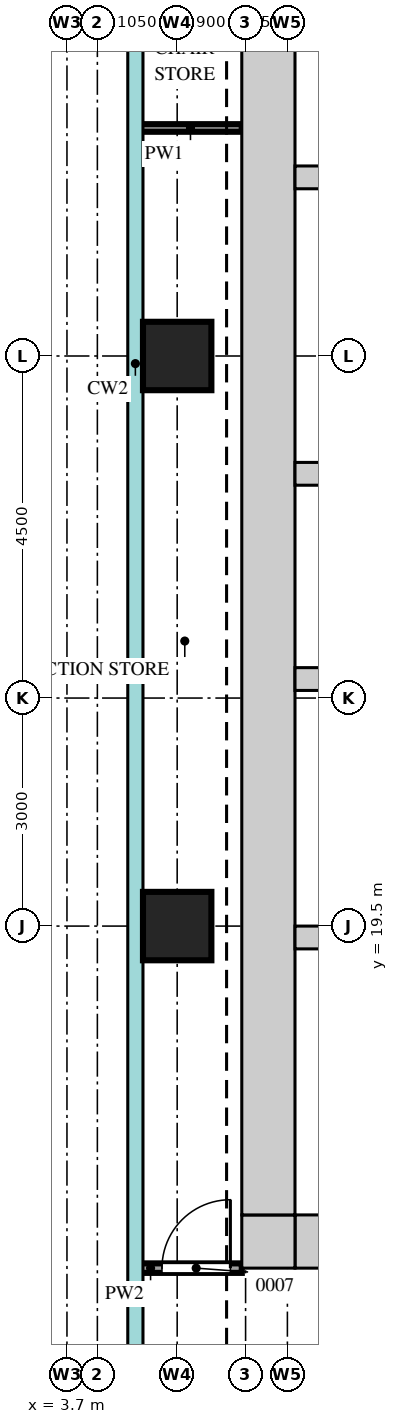
"""IFC4 building model, lengths in metres.
Left out: names, types, materials, properties, quantities, classifications, styles, units other than length and angle.
Written with IfcOpenShell. Run it as: python <this file> out.ifc"""

import sys

from ifc_helpers import new_model, si_unit, direction, frame, frame_2d, origin, origin_2d, place, context, subcontext, project, spatial, rectangle, extrude, source, transform, mapped, element, fill, save


model = new_model("IFC4")
c1 = context("Model", 3, precision=1e-05, world=origin(), true_north=direction((0.0, 1.0)))
c2 = subcontext(c1, "Body", "Model", "MODEL_VIEW")
j1 = project(units=[si_unit("LENGTHUNIT", "METRE"), si_unit("PLANEANGLEUNIT", "RADIAN")], contexts=[c1])
p1 = place(None, origin())
s1 = spatial("IfcSite", under=j1, at=p1, CompositionType="ELEMENT")
p2 = place(p1, origin())
s2 = spatial("IfcBuilding", under=s1, at=p2, CompositionType="ELEMENT")
p3 = place(p2, frame((0.0, 0.0, 262.2)))
s3 = spatial("IfcBuildingStorey", under=s2, at=p3, CompositionType="ELEMENT", Elevation=262.2)
m1 = source(origin(), c2, "Body", "SweptSolid", [
    extrude(rectangle(XDim=13.6, YDim=0.7, at=frame_2d((6.8, 0.0))), origin(), (0.0, 0.0, 1.0), 3.75),
])
p4 = place(p3, frame((6.7, 15.35, 0.0), z_axis=(0.0, 0.0, 1.0), x_axis=(1.0, 0.0, 0.0)))
e1 = element("IfcWall", 1, at=p4, inside=s3, PredefinedType="SHEAR", context=c2, shape_type="MappedRepresentation", body=[
    mapped(m1, transform((0.0, 0.0, 0.0))),
])
m2 = source(origin(), c2, "Body", "SweptSolid", [
    extrude(rectangle(XDim=1.2, YDim=2.1, at=frame_2d((0.6, 1.05))), frame((0.0, 0.36, 0.0), z_axis=(0.0, -1.0, 0.0), x_axis=(1.0, 0.0, 0.0)), (0.0, 0.0, 1.0), 0.72),
])
p5 = place(p4, frame((5.5, 0.0, 0.0)))
e2 = element("IfcOpeningElement", 2, at=p5, cuts=e1, PredefinedType="OPENING", context=c2, shape_type="MappedRepresentation", body=[
    mapped(m2, transform((0.0, 0.0, 0.0))),
])
p6 = place(p4, frame((2.15, 0.0, 0.0)))
e3 = element("IfcOpeningElement", 3, at=p6, cuts=e1, PredefinedType="OPENING", context=c2, shape_type="MappedRepresentation", body=[
    mapped(m2, transform((0.0, 0.0, 0.0))),
])
m3 = source(origin(), c2, "Body", "SweptSolid", [
    extrude(rectangle(XDim=1.0, YDim=2.1, at=frame_2d((0.5, 1.05))), frame((0.0, 0.36, 0.0), z_axis=(0.0, -1.0, 0.0), x_axis=(1.0, 0.0, 0.0)), (0.0, 0.0, 1.0), 0.72),
])
p7 = place(p4, frame((8.0, 0.0, 0.0)))
e4 = element("IfcOpeningElement", 4, at=p7, cuts=e1, PredefinedType="OPENING", context=c2, shape_type="MappedRepresentation", body=[
    mapped(m3, transform((0.0, 0.0, 0.0))),
])
m4 = source(origin(), c2, "Body", "SweptSolid", [
    extrude(rectangle(XDim=0.7, YDim=0.7, at=frame_2d((0.35, 0.0))), origin(), (0.0, 0.0, 1.0), 3.75),
])
p8 = place(p3, frame((6.0, 15.35, 0.0), z_axis=(0.0, 0.0, 1.0), x_axis=(1.0, 0.0, 0.0)))
e5 = element("IfcWall", 5, at=p8, inside=s3, PredefinedType="SHEAR", context=c2, shape_type="MappedRepresentation", body=[
    mapped(m4, transform((0.0, 0.0, 0.0))),
])
m5 = source(origin(), c2, "Body", "SweptSolid", [
    extrude(rectangle(XDim=22.6, YDim=0.7, at=frame_2d((11.3, 0.0))), origin(), (0.0, 0.0, 1.0), 3.75),
])
p9 = place(p3, frame((6.35, 15.7, 0.0), z_axis=(0.0, 0.0, 1.0), x_axis=(0.0, 1.0, 0.0)))
e6 = element("IfcWall", 6, at=p9, inside=s3, PredefinedType="SHEAR", context=c2, shape_type="MappedRepresentation", body=[
    mapped(m5, transform((0.0, 0.0, 0.0))),
])
m6 = source(origin(), c2, "Body", "SweptSolid", [
    extrude(rectangle(XDim=13.6, YDim=0.3, at=frame_2d((6.8, 0.0))), origin(), (0.0, 0.0, 1.0), 3.75),
])
p10 = place(p3, frame((6.7, 22.75, 0.0), z_axis=(0.0, 0.0, 1.0), x_axis=(1.0, 0.0, 0.0)))
e7 = element("IfcWall", 7, at=p10, inside=s3, PredefinedType="STANDARD", context=c2, shape_type="MappedRepresentation", body=[
    mapped(m6, transform((0.0, 0.0, 0.0))),
])
m7 = source(origin(), c2, "Body", "SweptSolid", [
    extrude(rectangle(XDim=9.375, YDim=0.3, at=frame_2d((4.688, 0.0))), origin(), (0.0, 0.0, 1.0), 3.75),
])
p11 = place(p3, frame((6.7, 19.35, 0.0), z_axis=(0.0, 0.0, 1.0), x_axis=(1.0, 0.0, 0.0)))
e8 = element("IfcWall", 8, at=p11, inside=s3, PredefinedType="STANDARD", context=c2, shape_type="MappedRepresentation", body=[
    mapped(m7, transform((0.0, 0.0, 0.0))),
])
m8 = source(origin(), c2, "Body", "SweptSolid", [
    extrude(rectangle(XDim=1.2, YDim=2.1, at=frame_2d((0.6, 1.05))), frame((0.0, 0.16, 0.0), z_axis=(0.0, -1.0, 0.0), x_axis=(1.0, 0.0, 0.0)), (0.0, 0.0, 1.0), 0.32),
])
p12 = place(p11, frame((0.95, 0.0, 0.0)))
e9 = element("IfcOpeningElement", 9, at=p12, cuts=e8, PredefinedType="OPENING", context=c2, shape_type="MappedRepresentation", body=[
    mapped(m8, transform((0.0, 0.0, 0.0))),
])
p13 = place(p11, frame((3.3, 0.0, 0.0)))
e10 = element("IfcOpeningElement", 10, at=p13, cuts=e8, PredefinedType="OPENING", context=c2, shape_type="MappedRepresentation", body=[
    mapped(m8, transform((0.0, 0.0, 0.0))),
])
p14 = place(p11, frame((5.55, 0.0, 0.0)))
e11 = element("IfcOpeningElement", 11, at=p14, cuts=e8, PredefinedType="OPENING", context=c2, shape_type="MappedRepresentation", body=[
    mapped(m8, transform((0.0, 0.0, 0.0))),
])
p15 = place(p11, frame((7.7, 0.0, 0.0)))
e12 = element("IfcOpeningElement", 12, at=p15, cuts=e8, PredefinedType="OPENING", context=c2, shape_type="MappedRepresentation", body=[
    mapped(m8, transform((0.0, 0.0, 0.0))),
])
p16 = place(p3, frame((6.7, 29.35, 0.0), z_axis=(0.0, 0.0, 1.0), x_axis=(1.0, 0.0, 0.0)))
e13 = element("IfcWall", 13, at=p16, inside=s3, PredefinedType="STANDARD", context=c2, shape_type="MappedRepresentation", body=[
    mapped(m6, transform((0.0, 0.0, 0.0))),
])
p17 = place(p16, frame((1.05, 0.0, 0.0)))
e14 = element("IfcOpeningElement", 14, at=p17, cuts=e13, PredefinedType="OPENING", context=c2, shape_type="MappedRepresentation", body=[
    mapped(m8, transform((0.0, 0.0, 0.0))),
])
p18 = place(p16, frame((3.6, 0.0, 0.0)))
e15 = element("IfcOpeningElement", 15, at=p18, cuts=e13, PredefinedType="OPENING", context=c2, shape_type="MappedRepresentation", body=[
    mapped(m8, transform((0.0, 0.0, 0.0))),
])
p19 = place(p16, frame((6.15, 0.0, 0.0)))
e16 = element("IfcOpeningElement", 16, at=p19, cuts=e13, PredefinedType="OPENING", context=c2, shape_type="MappedRepresentation", body=[
    mapped(m8, transform((0.0, 0.0, 0.0))),
])
p20 = place(p3, frame((6.7, 25.45, 0.0), z_axis=(0.0, 0.0, 1.0), x_axis=(1.0, 0.0, 0.0)))
e17 = element("IfcWall", 17, at=p20, inside=s3, PredefinedType="STANDARD", context=c2, shape_type="MappedRepresentation", body=[
    mapped(m6, transform((0.0, 0.0, 0.0))),
])
p21 = place(p20, frame((1.05, 0.0, 0.0)))
e18 = element("IfcOpeningElement", 18, at=p21, cuts=e17, PredefinedType="OPENING", context=c2, shape_type="MappedRepresentation", body=[
    mapped(m8, transform((0.0, 0.0, 0.0))),
])
p22 = place(p20, frame((3.6, 0.0, 0.0)))
e19 = element("IfcOpeningElement", 19, at=p22, cuts=e17, PredefinedType="OPENING", context=c2, shape_type="MappedRepresentation", body=[
    mapped(m8, transform((0.0, 0.0, 0.0))),
])
p23 = place(p20, frame((6.15, 0.0, 0.0)))
e20 = element("IfcOpeningElement", 20, at=p23, cuts=e17, PredefinedType="OPENING", context=c2, shape_type="MappedRepresentation", body=[
    mapped(m8, transform((0.0, 0.0, 0.0))),
])
m9 = source(origin(), c2, "Body", "SweptSolid", [
    extrude(rectangle(XDim=0.9, YDim=0.9, at=origin_2d()), origin(), (0.0, 0.0, 1.0), 3.75),
])
for number, where, z_axis, x_axis in (
    (21, (5.15, 19.5, 0.0), (0.0, 0.0, 1.0), (1.0, 0.0, 0.0)),
    (22, (5.15, 27.0, 0.0), (0.0, 0.0, 1.0), (1.0, 0.0, 0.0)),
):
    element("IfcColumn", number, at=place(p3, frame(where, z_axis=z_axis, x_axis=x_axis)), inside=s3, PredefinedType="COLUMN", context=c2, shape_type="MappedRepresentation", body=[
        mapped(m9, transform((0.0, 0.0, 0.0))),
    ])
m10 = source(origin(), c2, "Body", "SweptSolid", [
    extrude(rectangle(XDim=1.35, YDim=0.125, at=frame_2d((0.675, 0.0))), origin(), (0.0, 0.0, 1.0), 3.8),
])
p24 = place(p3, frame((4.65, 15.0, 0.0), z_axis=(0.0, 0.0, 1.0), x_axis=(1.0, 0.0, 0.0)))
e23 = element("IfcWall", 23, at=p24, inside=s3, PredefinedType="PARTITIONING", context=c2, shape_type="MappedRepresentation", body=[
    mapped(m10, transform((0.0, 0.0, 0.0))),
])
m11 = source(origin(), c2, "Body", "SweptSolid", [
    extrude(rectangle(XDim=0.9, YDim=2.1, at=frame_2d((0.45, 1.05))), frame((0.0, 0.073, 0.0), z_axis=(0.0, -1.0, 0.0), x_axis=(1.0, 0.0, 0.0)), (0.0, 0.0, 1.0), 0.145),
])
p25 = place(p24, frame((0.3, 0.0, 0.0)))
e24 = element("IfcOpeningElement", 24, at=p25, cuts=e23, PredefinedType="OPENING", context=c2, shape_type="MappedRepresentation", body=[
    mapped(m11, transform((0.0, 0.0, 0.0))),
])
m12 = source(origin(), c2, "Body", "SweptSolid", [
    extrude(rectangle(XDim=1.35, YDim=0.1, at=frame_2d((0.675, 0.0))), origin(), (0.0, 0.0, 1.0), 3.8),
])
p26 = place(p3, frame((4.65, 30.0, 0.0), z_axis=(0.0, 0.0, 1.0), x_axis=(1.0, 0.0, 0.0)))
e25 = element("IfcWall", 25, at=p26, inside=s3, PredefinedType="PARTITIONING", context=c2, shape_type="MappedRepresentation", body=[
    mapped(m12, transform((0.0, 0.0, 0.0))),
])
m13 = source(origin(), c2, "Body", "SweptSolid", [
    extrude(rectangle(XDim=0.9, YDim=2.1, at=frame_2d((0.45, 1.05))), frame((0.0, 0.025, 0.0), z_axis=(0.0, -1.0, 0.0), x_axis=(1.0, 0.0, 0.0)), (0.0, 0.0, 1.0), 0.05),
])
p27 = place(p25, origin())
e26 = element("IfcDoor", 26, at=p27, inside=s3, OperationType="SINGLE_SWING_LEFT", PredefinedType="DOOR", context=c2, shape_type="MappedRepresentation", body=[
    mapped(m13, transform((0.0, 0.0, 0.0))),
])
fill(e24, e26)
save(model, sys.argv[1])
